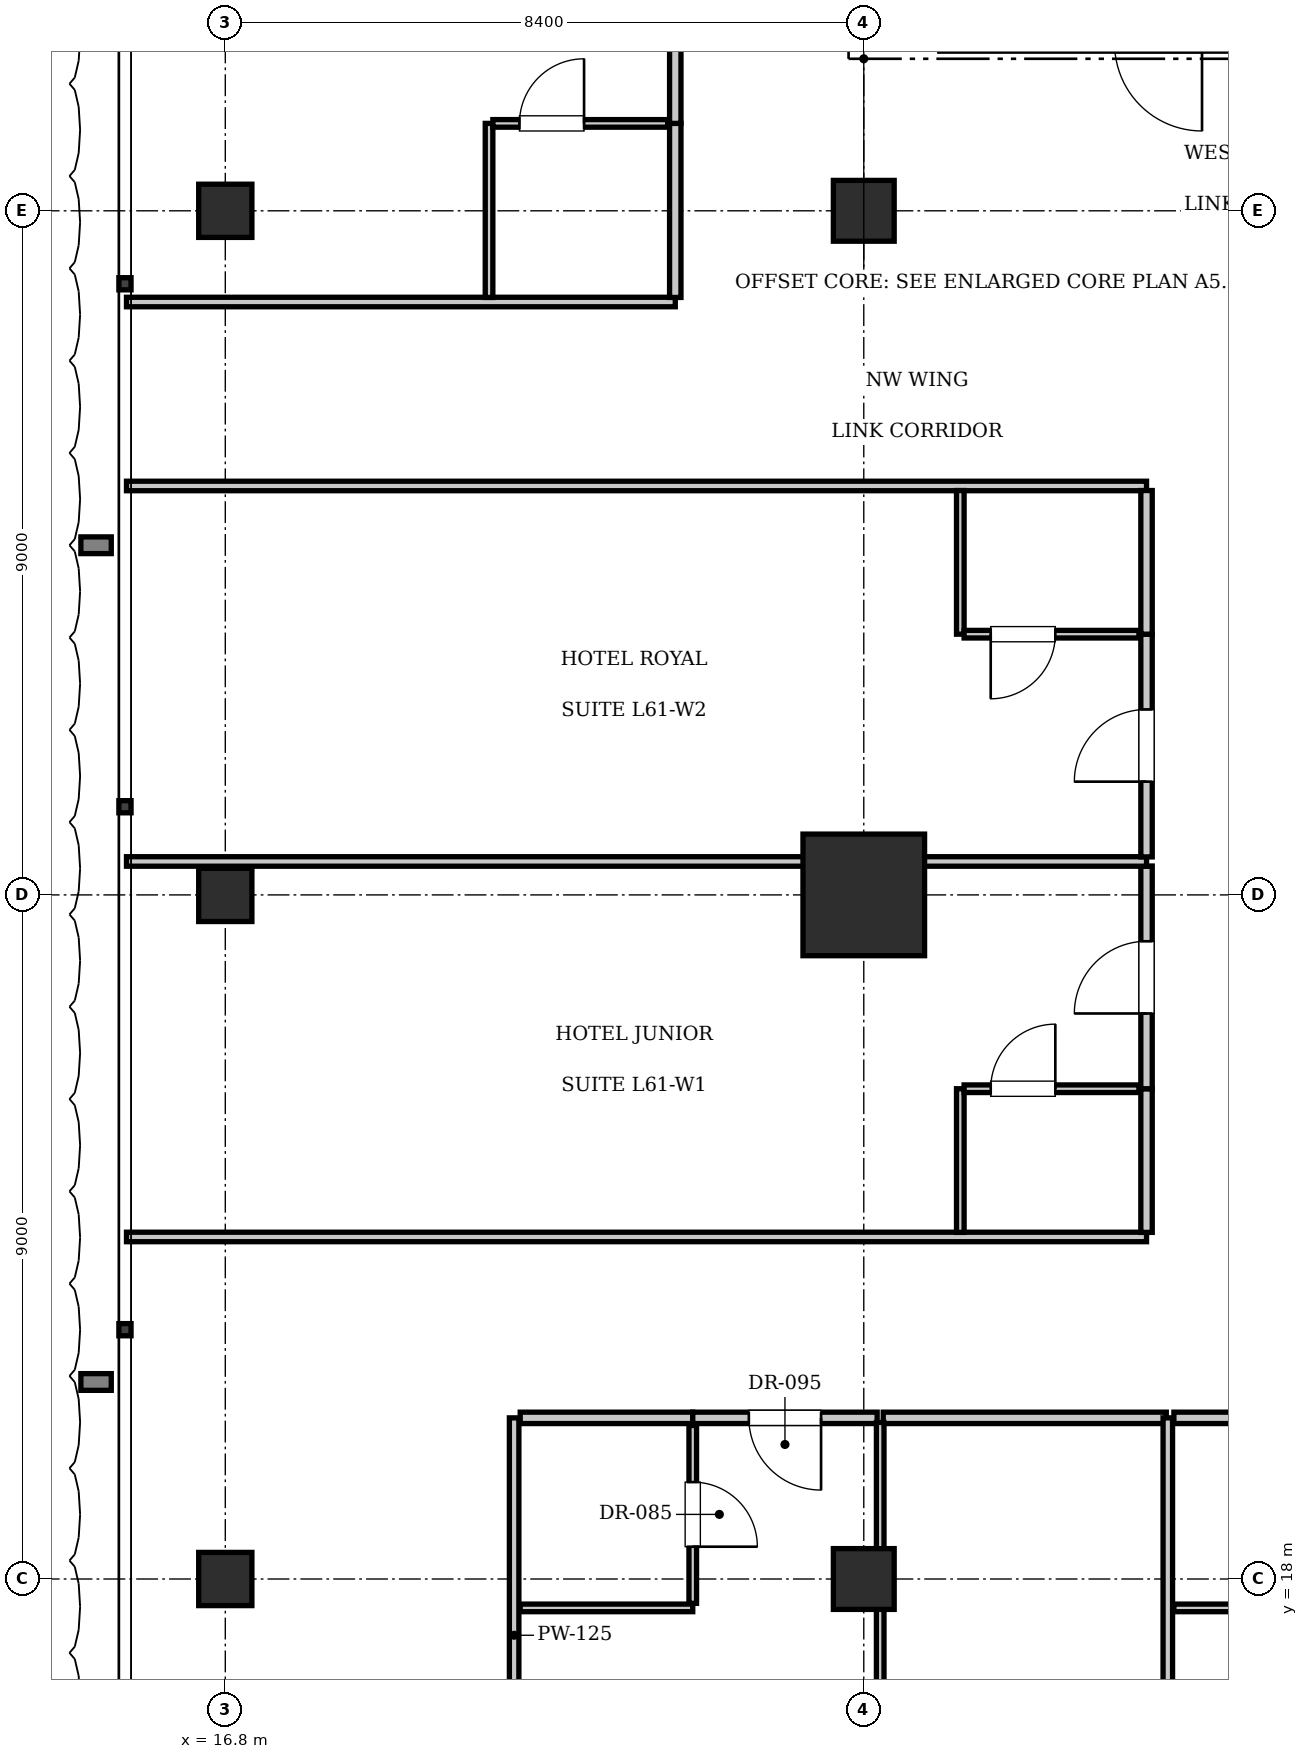
"""IFC4 building model, lengths in metres.
Left out: names, types, materials, properties, quantities, classifications, styles, units other than length and angle.
Written with IfcOpenShell. Run it as: python <this file> out.ifc"""

import sys

from ifc_helpers import new_model, si_unit, direction, frame, frame_2d, origin, origin_2d, place, context, subcontext, project, spatial, rectangle, extrude, element, fill, save


model = new_model("IFC4")
c1 = context("Model", 3, precision=1e-05, world=origin(), true_north=direction((0.0, 1.0)))
c2 = subcontext(c1, "Body", "Model", "MODEL_VIEW")
j1 = project(units=[si_unit("LENGTHUNIT", "METRE"), si_unit("PLANEANGLEUNIT", "RADIAN")], contexts=[c1])
p1 = place(None, origin())
s1 = spatial("IfcSite", under=j1, at=p1, CompositionType="ELEMENT")
p2 = place(p1, origin())
s2 = spatial("IfcBuilding", under=s1, at=p2, CompositionType="ELEMENT")
p3 = place(p2, frame((0.0, 0.0, 250.95)))
s3 = spatial("IfcBuildingStorey", under=s2, at=p3, CompositionType="ELEMENT", Elevation=250.95)
p4 = place(p3, frame((25.2, 27.0, 0.0), z_axis=(0.0, 0.0, 1.0), x_axis=(1.0, 0.0, 0.0)))
e1 = element("IfcColumn", 1, at=p4, inside=s3, PredefinedType="COLUMN", context=c2, shape_type="SweptSolid", body=[
    extrude(rectangle(XDim=1.6, YDim=1.6, at=origin_2d()), origin(), (0.0, 0.0, 1.0), 3.85),
])
for number, where, z_axis, x_axis in (
    (2, (25.2, 36.0, 0.0), (0.0, 0.0, 1.0), (1.0, 0.0, 0.0)),
    (3, (25.2, 18.0, 0.0), (0.0, 0.0, 1.0), (1.0, 0.0, 0.0)),
):
    element("IfcColumn", number, at=place(p3, frame(where, z_axis=z_axis, x_axis=x_axis)), inside=s3, PredefinedType="COLUMN", context=c2, shape_type="SweptSolid", body=[
        extrude(rectangle(XDim=0.8, YDim=0.8, at=origin_2d()), origin(), (0.0, 0.0, 1.0), 3.85),
    ])
for number, where, z_axis, x_axis in (
    (4, (16.8, 18.0, 0.0), (0.0, 0.0, 1.0), (1.0, 0.0, 0.0)),
    (5, (16.8, 27.0, 0.0), (0.0, 0.0, 1.0), (1.0, 0.0, 0.0)),
    (6, (16.8, 36.0, 0.0), (0.0, 0.0, 1.0), (1.0, 0.0, 0.0)),
):
    element("IfcColumn", number, at=place(p3, frame(where, z_axis=z_axis, x_axis=x_axis)), inside=s3, PredefinedType="COLUMN", context=c2, shape_type="SweptSolid", body=[
        extrude(rectangle(XDim=0.7, YDim=0.7, at=origin_2d()), origin(), (0.0, 0.0, 1.0), 3.85),
    ])
p5 = place(p3, frame((20.6, 14.4, 0.0), z_axis=(0.0, 0.0, 1.0), x_axis=(0.0, 1.0, 0.0)))
e7 = element("IfcWall", 7, at=p5, inside=s3, PredefinedType="PARTITIONING", context=c2, shape_type="SweptSolid", body=[
    extrude(rectangle(XDim=5.72, YDim=0.125, at=frame_2d((2.86, 0.0))), origin(), (0.0, 0.0, 1.0), 3.61),
])
p6 = place(p3, frame((20.68, 20.12, 0.0), z_axis=(0.0, 0.0, 1.0), x_axis=(1.0, 0.0, 0.0)))
e8 = element("IfcWall", 8, at=p6, inside=s3, PredefinedType="PARTITIONING", context=c2, shape_type="SweptSolid", body=[
    extrude(rectangle(XDim=2.27, YDim=0.15, at=frame_2d((1.135, 0.0))), origin(), (0.0, 0.0, 1.0), 3.61),
])
p7 = place(p3, frame((20.68, 17.62, 0.0), z_axis=(0.0, 0.0, 1.0), x_axis=(1.0, 0.0, 0.0)))
e9 = element("IfcWall", 9, at=p7, inside=s3, PredefinedType="PARTITIONING", context=c2, shape_type="SweptSolid", body=[
    extrude(rectangle(XDim=2.27, YDim=0.1, at=frame_2d((1.135, 0.0))), origin(), (0.0, 0.0, 1.0), 3.61),
])
p8 = place(p3, frame((22.95, 17.68, 0.0), z_axis=(0.0, 0.0, 1.0), x_axis=(0.0, 1.0, 0.0)))
e10 = element("IfcWall", 10, at=p8, inside=s3, PredefinedType="PARTITIONING", context=c2, shape_type="SweptSolid", body=[
    extrude(rectangle(XDim=2.34, YDim=0.1, at=frame_2d((1.17, 0.0))), origin(), (0.0, 0.0, 1.0), 3.61),
])
p9 = place(p8, frame((0.745, 0.0, 0.0)))
e11 = element("IfcOpeningElement", 11, at=p9, cuts=e10, PredefinedType="OPENING", context=c2, shape_type="SweptSolid", body=[
    extrude(rectangle(XDim=0.85, YDim=2.1, at=frame_2d((0.425, 1.05))), frame((0.0, 0.06, 0.0), z_axis=(0.0, -1.0, 0.0), x_axis=(1.0, 0.0, 0.0)), (0.0, 0.0, 1.0), 0.12),
])
p10 = place(p3, frame((22.95, 20.12, 0.0), z_axis=(0.0, 0.0, 1.0), x_axis=(1.0, 0.0, 0.0)))
e12 = element("IfcWall", 12, at=p10, inside=s3, PredefinedType="PARTITIONING", context=c2, shape_type="SweptSolid", body=[
    extrude(rectangle(XDim=2.426, YDim=0.15, at=frame_2d((1.213, 0.0))), origin(), (0.0, 0.0, 1.0), 3.61),
])
p11 = place(p10, frame((0.738, 0.0, 0.0)))
e13 = element("IfcOpeningElement", 13, at=p11, cuts=e12, PredefinedType="OPENING", context=c2, shape_type="SweptSolid", body=[
    extrude(rectangle(XDim=0.95, YDim=2.15, at=frame_2d((0.475, 1.075))), frame((0.0, 0.085, 0.0), z_axis=(0.0, -1.0, 0.0), x_axis=(1.0, 0.0, 0.0)), (0.0, 0.0, 1.0), 0.17),
])
p12 = place(p3, frame((25.456, 20.12, 0.0), z_axis=(0.0, 0.0, 1.0), x_axis=(1.0, 0.0, 0.0)))
e14 = element("IfcWall", 14, at=p12, inside=s3, PredefinedType="PARTITIONING", context=c2, shape_type="SweptSolid", body=[
    extrude(rectangle(XDim=3.724, YDim=0.15, at=frame_2d((1.862, 0.0))), origin(), (0.0, 0.0, 1.0), 3.61),
])
p13 = place(p3, frame((25.416, 9.23, 0.0), z_axis=(0.0, 0.0, 1.0), x_axis=(0.0, 1.0, 0.0)))
e15 = element("IfcWall", 15, at=p13, inside=s3, PredefinedType="PARTITIONING", context=c2, shape_type="SweptSolid", body=[
    extrude(rectangle(XDim=10.83, YDim=0.1, at=frame_2d((5.415, 0.0))), origin(), (0.0, 0.0, 1.0), 3.61),
])
p14 = place(p13, frame((1.6, 0.0, 0.0)))
e16 = element("IfcOpeningElement", 16, at=p14, cuts=e15, PredefinedType="OPENING", context=c2, shape_type="SweptSolid", body=[
    extrude(rectangle(XDim=0.9, YDim=2.1, at=frame_2d((0.45, 1.05))), frame((0.0, 0.06, 0.0), z_axis=(0.0, -1.0, 0.0), x_axis=(1.0, 0.0, 0.0)), (0.0, 0.0, 1.0), 0.12),
])
p15 = place(p3, frame((29.2, 9.3, 0.0), z_axis=(0.0, 0.0, 1.0), x_axis=(0.0, 1.0, 0.0)))
e17 = element("IfcWall", 17, at=p15, inside=s3, PredefinedType="PARTITIONING", context=c2, shape_type="SweptSolid", body=[
    extrude(rectangle(XDim=10.82, YDim=0.125, at=frame_2d((5.41, 0.0))), origin(), (0.0, 0.0, 1.0), 3.61),
])
p16 = place(p3, frame((29.28, 20.12, 0.0), z_axis=(0.0, 0.0, 1.0), x_axis=(1.0, 0.0, 0.0)))
e18 = element("IfcWall", 18, at=p16, inside=s3, PredefinedType="PARTITIONING", context=c2, shape_type="SweptSolid", body=[
    extrude(rectangle(XDim=2.27, YDim=0.15, at=frame_2d((1.135, 0.0))), origin(), (0.0, 0.0, 1.0), 3.61),
])
p17 = place(p3, frame((29.28, 17.62, 0.0), z_axis=(0.0, 0.0, 1.0), x_axis=(1.0, 0.0, 0.0)))
e19 = element("IfcWall", 19, at=p17, inside=s3, PredefinedType="PARTITIONING", context=c2, shape_type="SweptSolid", body=[
    extrude(rectangle(XDim=2.27, YDim=0.1, at=frame_2d((1.135, 0.0))), origin(), (0.0, 0.0, 1.0), 3.61),
])
for number, where, z_axis, x_axis in (
    (20, (15.5, 22.5, 0.0), (0.0, 0.0, 1.0), (1.0, 0.0, 0.0)),
    (21, (15.5, 32.38, 0.0), (0.0, 0.0, 1.0), (1.0, 0.0, 0.0)),
):
    element("IfcWall", number, at=place(p3, frame(where, z_axis=z_axis, x_axis=x_axis)), inside=s3, PredefinedType="PARTITIONING", context=c2, shape_type="SweptSolid", body=[
        extrude(rectangle(XDim=13.42, YDim=0.125, at=frame_2d((6.71, 0.0))), origin(), (0.0, 0.0, 1.0), 3.61),
    ])
p18 = place(p3, frame((28.92, 22.56, 0.0), z_axis=(0.0, 0.0, 1.0), x_axis=(0.0, 1.0, 0.0)))
e22 = element("IfcWall", 22, at=p18, inside=s3, PredefinedType="PARTITIONING", context=c2, shape_type="SweptSolid", body=[
    extrude(rectangle(XDim=1.89, YDim=0.15, at=frame_2d((0.945, 0.0))), origin(), (0.0, 0.0, 1.0), 3.61),
])
p19 = place(p3, frame((28.92, 24.45, 0.0), z_axis=(0.0, 0.0, 1.0), x_axis=(0.0, 1.0, 0.0)))
e23 = element("IfcWall", 23, at=p19, inside=s3, PredefinedType="PARTITIONING", context=c2, shape_type="SweptSolid", body=[
    extrude(rectangle(XDim=2.93, YDim=0.15, at=frame_2d((1.465, 0.0))), origin(), (0.0, 0.0, 1.0), 3.61),
])
p20 = place(p19, frame((0.99, 0.0, 0.0)))
e24 = element("IfcOpeningElement", 24, at=p20, cuts=e23, PredefinedType="OPENING", context=c2, shape_type="SweptSolid", body=[
    extrude(rectangle(XDim=0.95, YDim=2.15, at=frame_2d((0.475, 1.075))), frame((0.0, 0.085, 0.0), z_axis=(0.0, -1.0, 0.0), x_axis=(1.0, 0.0, 0.0)), (0.0, 0.0, 1.0), 0.17),
])
p21 = place(p3, frame((26.47, 22.56, 0.0), z_axis=(0.0, 0.0, 1.0), x_axis=(0.0, 1.0, 0.0)))
e25 = element("IfcWall", 25, at=p21, inside=s3, PredefinedType="PARTITIONING", context=c2, shape_type="SweptSolid", body=[
    extrude(rectangle(XDim=1.89, YDim=0.1, at=frame_2d((0.945, 0.0))), origin(), (0.0, 0.0, 1.0), 3.61),
])
p22 = place(p3, frame((26.52, 24.45, 0.0), z_axis=(0.0, 0.0, 1.0), x_axis=(1.0, 0.0, 0.0)))
e26 = element("IfcWall", 26, at=p22, inside=s3, PredefinedType="PARTITIONING", context=c2, shape_type="SweptSolid", body=[
    extrude(rectangle(XDim=2.3, YDim=0.1, at=frame_2d((1.15, 0.0))), origin(), (0.0, 0.0, 1.0), 3.61),
])
p23 = place(p22, frame((0.35, 0.0, 0.0)))
e27 = element("IfcOpeningElement", 27, at=p23, cuts=e26, PredefinedType="OPENING", context=c2, shape_type="SweptSolid", body=[
    extrude(rectangle(XDim=0.85, YDim=2.1, at=frame_2d((0.425, 1.05))), frame((0.0, 0.06, 0.0), z_axis=(0.0, -1.0, 0.0), x_axis=(1.0, 0.0, 0.0)), (0.0, 0.0, 1.0), 0.12),
])
p24 = place(p3, frame((15.5, 27.44, 0.0), z_axis=(0.0, 0.0, 1.0), x_axis=(1.0, 0.0, 0.0)))
e28 = element("IfcWall", 28, at=p24, inside=s3, PredefinedType="PARTITIONING", context=c2, shape_type="SweptSolid", body=[
    extrude(rectangle(XDim=13.42, YDim=0.125, at=frame_2d((6.71, 0.0))), origin(), (0.0, 0.0, 1.0), 3.61),
])
p25 = place(p3, frame((28.92, 27.5, 0.0), z_axis=(0.0, 0.0, 1.0), x_axis=(0.0, 1.0, 0.0)))
e29 = element("IfcWall", 29, at=p25, inside=s3, PredefinedType="PARTITIONING", context=c2, shape_type="SweptSolid", body=[
    extrude(rectangle(XDim=2.93, YDim=0.15, at=frame_2d((1.465, 0.0))), origin(), (0.0, 0.0, 1.0), 3.61),
])
p26 = place(p25, frame((0.99, 0.0, 0.0)))
e30 = element("IfcOpeningElement", 30, at=p26, cuts=e29, PredefinedType="OPENING", context=c2, shape_type="SweptSolid", body=[
    extrude(rectangle(XDim=0.95, YDim=2.15, at=frame_2d((0.475, 1.075))), frame((0.0, 0.085, 0.0), z_axis=(0.0, -1.0, 0.0), x_axis=(1.0, 0.0, 0.0)), (0.0, 0.0, 1.0), 0.17),
])
p27 = place(p3, frame((28.92, 30.43, 0.0), z_axis=(0.0, 0.0, 1.0), x_axis=(0.0, 1.0, 0.0)))
e31 = element("IfcWall", 31, at=p27, inside=s3, PredefinedType="PARTITIONING", context=c2, shape_type="SweptSolid", body=[
    extrude(rectangle(XDim=1.89, YDim=0.15, at=frame_2d((0.945, 0.0))), origin(), (0.0, 0.0, 1.0), 3.61),
])
p28 = place(p3, frame((26.47, 30.43, 0.0), z_axis=(0.0, 0.0, 1.0), x_axis=(0.0, 1.0, 0.0)))
e32 = element("IfcWall", 32, at=p28, inside=s3, PredefinedType="PARTITIONING", context=c2, shape_type="SweptSolid", body=[
    extrude(rectangle(XDim=1.89, YDim=0.1, at=frame_2d((0.945, 0.0))), origin(), (0.0, 0.0, 1.0), 3.61),
])
p29 = place(p3, frame((26.52, 30.43, 0.0), z_axis=(0.0, 0.0, 1.0), x_axis=(1.0, 0.0, 0.0)))
e33 = element("IfcWall", 33, at=p29, inside=s3, PredefinedType="PARTITIONING", context=c2, shape_type="SweptSolid", body=[
    extrude(rectangle(XDim=2.3, YDim=0.1, at=frame_2d((1.15, 0.0))), origin(), (0.0, 0.0, 1.0), 3.61),
])
p30 = place(p29, frame((0.35, 0.0, 0.0)))
e34 = element("IfcOpeningElement", 34, at=p30, cuts=e33, PredefinedType="OPENING", context=c2, shape_type="SweptSolid", body=[
    extrude(rectangle(XDim=0.85, YDim=2.1, at=frame_2d((0.425, 1.05))), frame((0.0, 0.06, 0.0), z_axis=(0.0, -1.0, 0.0), x_axis=(1.0, 0.0, 0.0)), (0.0, 0.0, 1.0), 0.12),
])
p31 = place(p3, frame((15.5, 34.8, 0.0), z_axis=(0.0, 0.0, 1.0), x_axis=(1.0, 0.0, 0.0)))
e35 = element("IfcWall", 35, at=p31, inside=s3, PredefinedType="PARTITIONING", context=c2, shape_type="SweptSolid", body=[
    extrude(rectangle(XDim=7.22, YDim=0.125, at=frame_2d((3.61, 0.0))), origin(), (0.0, 0.0, 1.0), 3.61),
])
p32 = place(p3, frame((22.72, 34.86, 0.0), z_axis=(0.0, 0.0, 1.0), x_axis=(0.0, 1.0, 0.0)))
e36 = element("IfcWall", 36, at=p32, inside=s3, PredefinedType="PARTITIONING", context=c2, shape_type="SweptSolid", body=[
    extrude(rectangle(XDim=2.29, YDim=0.15, at=frame_2d((1.145, 0.0))), origin(), (0.0, 0.0, 1.0), 3.61),
])
p33 = place(p3, frame((22.72, 37.15, 0.0), z_axis=(0.0, 0.0, 1.0), x_axis=(0.0, 1.0, 0.0)))
e37 = element("IfcWall", 37, at=p33, inside=s3, PredefinedType="PARTITIONING", context=c2, shape_type="SweptSolid", body=[
    extrude(rectangle(XDim=4.559, YDim=0.15, at=frame_2d((2.279, 0.0))), origin(), (0.0, 0.0, 1.0), 3.61),
])
p34 = place(p33, frame((1.804, 0.0, 0.0)))
e38 = element("IfcOpeningElement", 38, at=p34, cuts=e37, PredefinedType="OPENING", context=c2, shape_type="SweptSolid", body=[
    extrude(rectangle(XDim=0.95, YDim=2.15, at=frame_2d((0.475, 1.075))), frame((0.0, 0.085, 0.0), z_axis=(0.0, -1.0, 0.0), x_axis=(1.0, 0.0, 0.0)), (0.0, 0.0, 1.0), 0.17),
])
p35 = place(p3, frame((20.27, 34.86, 0.0), z_axis=(0.0, 0.0, 1.0), x_axis=(0.0, 1.0, 0.0)))
e39 = element("IfcWall", 39, at=p35, inside=s3, PredefinedType="PARTITIONING", context=c2, shape_type="SweptSolid", body=[
    extrude(rectangle(XDim=2.29, YDim=0.1, at=frame_2d((1.145, 0.0))), origin(), (0.0, 0.0, 1.0), 3.61),
])
p36 = place(p3, frame((20.32, 37.15, 0.0), z_axis=(0.0, 0.0, 1.0), x_axis=(1.0, 0.0, 0.0)))
e40 = element("IfcWall", 40, at=p36, inside=s3, PredefinedType="PARTITIONING", context=c2, shape_type="SweptSolid", body=[
    extrude(rectangle(XDim=2.3, YDim=0.1, at=frame_2d((1.15, 0.0))), origin(), (0.0, 0.0, 1.0), 3.61),
])
p37 = place(p36, frame((0.35, 0.0, 0.0)))
e41 = element("IfcOpeningElement", 41, at=p37, cuts=e40, PredefinedType="OPENING", context=c2, shape_type="SweptSolid", body=[
    extrude(rectangle(XDim=0.85, YDim=2.1, at=frame_2d((0.425, 1.05))), frame((0.0, 0.06, 0.0), z_axis=(0.0, -1.0, 0.0), x_axis=(1.0, 0.0, 0.0)), (0.0, 0.0, 1.0), 0.12),
])
p38 = place(p9, frame((0.85, 0.0, 0.0), z_axis=(0.0, 0.0, 1.0), x_axis=(-1.0, 0.0, 0.0)))
e42 = element("IfcDoor", 42, at=p38, inside=s3, OperationType="SINGLE_SWING_RIGHT", PredefinedType="DOOR", context=c2, shape_type="SweptSolid", body=[
    extrude(rectangle(XDim=0.85, YDim=2.1, at=frame_2d((0.425, 1.05))), frame((0.0, 0.025, 0.0), z_axis=(0.0, -1.0, 0.0), x_axis=(1.0, 0.0, 0.0)), (0.0, 0.0, 1.0), 0.05),
])
fill(e11, e42)
p39 = place(p11, frame((0.95, 0.0, 0.0), z_axis=(0.0, 0.0, 1.0), x_axis=(-1.0, 0.0, 0.0)))
e43 = element("IfcDoor", 43, at=p39, inside=s3, OperationType="SINGLE_SWING_LEFT", PredefinedType="DOOR", context=c2, shape_type="SweptSolid", body=[
    extrude(rectangle(XDim=0.95, YDim=2.15, at=frame_2d((0.475, 1.075))), frame((0.0, 0.025, 0.0), z_axis=(0.0, -1.0, 0.0), x_axis=(1.0, 0.0, 0.0)), (0.0, 0.0, 1.0), 0.05),
])
fill(e13, e43)
p40 = place(p23, origin())
e44 = element("IfcDoor", 44, at=p40, inside=s3, OperationType="SINGLE_SWING_RIGHT", PredefinedType="DOOR", context=c2, shape_type="SweptSolid", body=[
    extrude(rectangle(XDim=0.85, YDim=2.1, at=frame_2d((0.425, 1.05))), frame((0.0, 0.025, 0.0), z_axis=(0.0, -1.0, 0.0), x_axis=(1.0, 0.0, 0.0)), (0.0, 0.0, 1.0), 0.05),
])
fill(e27, e44)
p41 = place(p20, origin())
e45 = element("IfcDoor", 45, at=p41, inside=s3, OperationType="SINGLE_SWING_LEFT", PredefinedType="DOOR", context=c2, shape_type="SweptSolid", body=[
    extrude(rectangle(XDim=0.95, YDim=2.15, at=frame_2d((0.475, 1.075))), frame((0.0, 0.025, 0.0), z_axis=(0.0, -1.0, 0.0), x_axis=(1.0, 0.0, 0.0)), (0.0, 0.0, 1.0), 0.05),
])
fill(e24, e45)
p42 = place(p30, frame((0.85, 0.0, 0.0), z_axis=(0.0, 0.0, 1.0), x_axis=(-1.0, 0.0, 0.0)))
e46 = element("IfcDoor", 46, at=p42, inside=s3, OperationType="SINGLE_SWING_RIGHT", PredefinedType="DOOR", context=c2, shape_type="SweptSolid", body=[
    extrude(rectangle(XDim=0.85, YDim=2.1, at=frame_2d((0.425, 1.05))), frame((0.0, 0.025, 0.0), z_axis=(0.0, -1.0, 0.0), x_axis=(1.0, 0.0, 0.0)), (0.0, 0.0, 1.0), 0.05),
])
fill(e34, e46)
p43 = place(p26, origin())
e47 = element("IfcDoor", 47, at=p43, inside=s3, OperationType="SINGLE_SWING_LEFT", PredefinedType="DOOR", context=c2, shape_type="SweptSolid", body=[
    extrude(rectangle(XDim=0.95, YDim=2.15, at=frame_2d((0.475, 1.075))), frame((0.0, 0.025, 0.0), z_axis=(0.0, -1.0, 0.0), x_axis=(1.0, 0.0, 0.0)), (0.0, 0.0, 1.0), 0.05),
])
fill(e30, e47)
p44 = place(p37, origin())
e48 = element("IfcDoor", 48, at=p44, inside=s3, OperationType="SINGLE_SWING_RIGHT", PredefinedType="DOOR", context=c2, shape_type="SweptSolid", body=[
    extrude(rectangle(XDim=0.85, YDim=2.1, at=frame_2d((0.425, 1.05))), frame((0.0, 0.025, 0.0), z_axis=(0.0, -1.0, 0.0), x_axis=(1.0, 0.0, 0.0)), (0.0, 0.0, 1.0), 0.05),
])
fill(e41, e48)
save(model, sys.argv[1])
